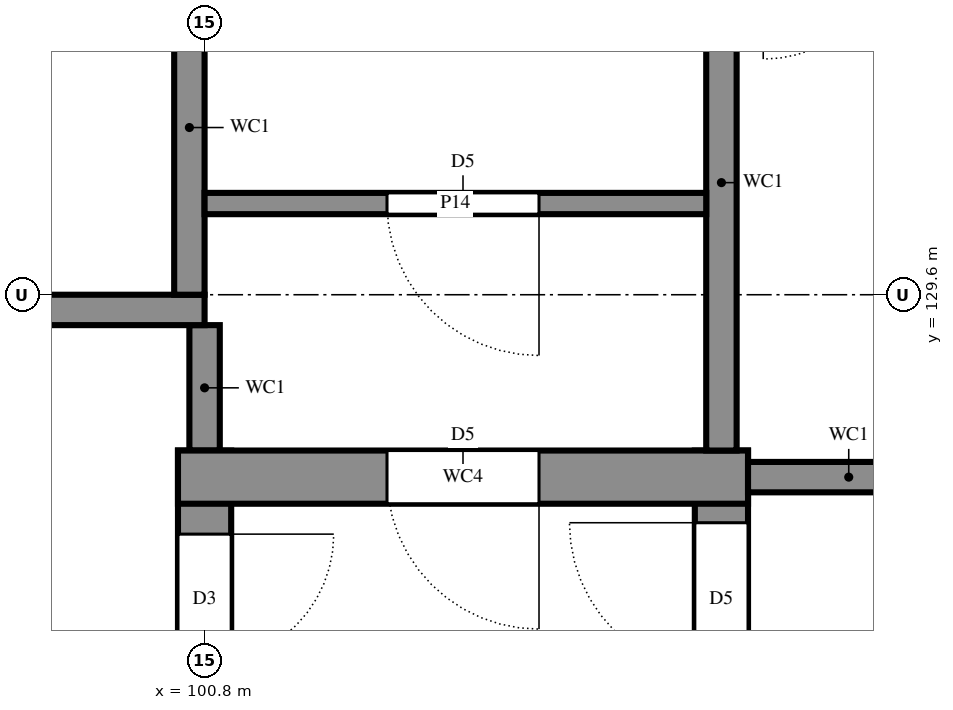
"""IFC4 building model, lengths in metres.
Left out: names, types, materials, properties, quantities, classifications, styles, units other than length and angle.
Written with IfcOpenShell. Run it as: python <this file> out.ifc"""

import sys

from ifc_helpers import new_model, si_unit, direction, frame, frame_2d, origin, place, context, subcontext, project, spatial, rectangle, extrude, element, fill, save


model = new_model("IFC4")
c1 = context("Model", 3, precision=1e-05, world=origin(), true_north=direction((0.0, 1.0)))
c2 = subcontext(c1, "Body", "Model", "MODEL_VIEW")
j1 = project(units=[si_unit("LENGTHUNIT", "METRE"), si_unit("PLANEANGLEUNIT", "RADIAN")], contexts=[c1])
p1 = place(None, origin())
s1 = spatial("IfcSite", under=j1, at=p1, CompositionType="ELEMENT")
p2 = place(p1, origin())
s2 = spatial("IfcBuilding", under=s1, at=p2, CompositionType="ELEMENT")
p3 = place(p2, frame((0.0, 0.0, 10.8)))
s3 = spatial("IfcBuildingStorey", under=s2, at=p3, CompositionType="ELEMENT", Elevation=10.8)
p4 = place(p3, frame((104.2, 125.1, 0.0), z_axis=(0.0, 0.0, 1.0), x_axis=(0.0, 1.0, 0.0)))
e1 = element("IfcWall", 1, at=p4, inside=s3, PredefinedType="SHEAR", context=c2, shape_type="SweptSolid", body=[
    extrude(rectangle(XDim=3.475, YDim=0.35, at=frame_2d((1.737, 0.0))), origin(), (0.0, 0.0, 1.0), 3.6),
])
p5 = place(p4, frame((2.0, 0.0, 0.0)))
e2 = element("IfcOpeningElement", 2, at=p5, cuts=e1, PredefinedType="OPENING", context=c2, shape_type="SweptSolid", body=[
    extrude(rectangle(XDim=1.0, YDim=2.1, at=frame_2d((0.5, 1.05))), frame((0.0, 0.185, 0.0), z_axis=(0.0, -1.0, 0.0), x_axis=(1.0, 0.0, 0.0)), (0.0, 0.0, 1.0), 0.37),
])
p6 = place(p3, frame((100.8, 128.575, 0.0), z_axis=(0.0, 0.0, 1.0), x_axis=(0.0, -1.0, 0.0)))
e3 = element("IfcWall", 3, at=p6, inside=s3, PredefinedType="SHEAR", context=c2, shape_type="SweptSolid", body=[
    extrude(rectangle(XDim=6.35, YDim=0.35, at=frame_2d((3.175, 0.0))), origin(), (0.0, 0.0, 1.0), 3.6),
])
p7 = place(p6, frame((0.55, 0.0, 0.0)))
e4 = element("IfcOpeningElement", 4, at=p7, cuts=e3, PredefinedType="OPENING", context=c2, shape_type="SweptSolid", body=[
    extrude(rectangle(XDim=0.85, YDim=2.1, at=frame_2d((0.425, 1.05))), frame((0.0, 0.185, 0.0), z_axis=(0.0, -1.0, 0.0), x_axis=(1.0, 0.0, 0.0)), (0.0, 0.0, 1.0), 0.37),
])
p8 = place(p3, frame((100.8, 128.575, 0.0), z_axis=(0.0, 0.0, 1.0), x_axis=(0.0, 1.0, 0.0)))
e5 = element("IfcWall", 5, at=p8, inside=s3, PredefinedType="SHEAR", context=c2, shape_type="SweptSolid", body=[
    extrude(rectangle(XDim=0.825, YDim=0.2, at=frame_2d((0.413, 0.0))), origin(), (0.0, 0.0, 1.0), 3.6),
])
p9 = place(p3, frame((104.375, 128.4, 0.0), z_axis=(0.0, 0.0, 1.0), x_axis=(-1.0, 0.0, 0.0)))
e6 = element("IfcWall", 6, at=p9, inside=s3, PredefinedType="SHEAR", context=c2, shape_type="SweptSolid", body=[
    extrude(rectangle(XDim=3.75, YDim=0.35, at=frame_2d((1.875, 0.0))), origin(), (0.0, 0.0, 1.0), 3.6),
])
p10 = place(p9, frame((1.375, 0.0, 0.0)))
e7 = element("IfcOpeningElement", 7, at=p10, cuts=e6, PredefinedType="OPENING", context=c2, shape_type="SweptSolid", body=[
    extrude(rectangle(XDim=1.0, YDim=2.1, at=frame_2d((0.5, 1.05))), frame((0.0, 0.185, 0.0), z_axis=(0.0, -1.0, 0.0), x_axis=(1.0, 0.0, 0.0)), (0.0, 0.0, 1.0), 0.37),
])
p11 = place(p3, frame((104.375, 128.4, 0.0), z_axis=(0.0, 0.0, 1.0), x_axis=(1.0, 0.0, 0.0)))
e8 = element("IfcWall", 8, at=p11, inside=s3, PredefinedType="SHEAR", context=c2, shape_type="SweptSolid", body=[
    extrude(rectangle(XDim=1.325, YDim=0.2, at=frame_2d((0.663, 0.0))), origin(), (0.0, 0.0, 1.0), 3.6),
])
p12 = place(p3, frame((104.2, 132.1, 0.0), z_axis=(0.0, 0.0, 1.0), x_axis=(0.0, -1.0, 0.0)))
e9 = element("IfcWall", 9, at=p12, inside=s3, PredefinedType="SHEAR", context=c2, shape_type="SweptSolid", body=[
    extrude(rectangle(XDim=3.525, YDim=0.2, at=frame_2d((1.763, 0.0))), origin(), (0.0, 0.0, 1.0), 3.6),
])
p13 = place(p3, frame((98.4, 129.5, 0.0), z_axis=(0.0, 0.0, 1.0), x_axis=(1.0, 0.0, 0.0)))
e10 = element("IfcWall", 10, at=p13, inside=s3, PredefinedType="SHEAR", context=c2, shape_type="SweptSolid", body=[
    extrude(rectangle(XDim=2.4, YDim=0.2, at=frame_2d((1.2, 0.0))), origin(), (0.0, 0.0, 1.0), 3.6),
])
p14 = place(p3, frame((100.7, 129.6, 0.0), z_axis=(0.0, 0.0, 1.0), x_axis=(0.0, 1.0, 0.0)))
e11 = element("IfcWall", 11, at=p14, inside=s3, PredefinedType="SHEAR", context=c2, shape_type="SweptSolid", body=[
    extrude(rectangle(XDim=2.2, YDim=0.2, at=frame_2d((1.1, 0.0))), origin(), (0.0, 0.0, 1.0), 3.6),
])
p15 = place(p3, frame((100.8, 130.2, 0.0), z_axis=(0.0, 0.0, 1.0), x_axis=(1.0, 0.0, 0.0)))
e12 = element("IfcWall", 12, at=p15, inside=s3, PredefinedType="PARTITIONING", context=c2, shape_type="SweptSolid", body=[
    extrude(rectangle(XDim=3.3, YDim=0.14, at=frame_2d((1.65, 0.0))), origin(), (0.0, 0.0, 1.0), 3.42),
])
p16 = place(p15, frame((1.2, 0.0, 0.0)))
e13 = element("IfcOpeningElement", 13, at=p16, cuts=e12, PredefinedType="OPENING", context=c2, shape_type="SweptSolid", body=[
    extrude(rectangle(XDim=1.0, YDim=2.1, at=frame_2d((0.5, 1.05))), frame((0.0, 0.08, 0.0), z_axis=(0.0, -1.0, 0.0), x_axis=(1.0, 0.0, 0.0)), (0.0, 0.0, 1.0), 0.16),
])
p17 = place(p16, frame((1.0, 0.0, 0.0), z_axis=(0.0, 0.0, 1.0), x_axis=(-1.0, 0.0, 0.0)))
e14 = element("IfcDoor", 14, at=p17, inside=s3, OperationType="SINGLE_SWING_RIGHT", PredefinedType="DOOR", context=c2, shape_type="SweptSolid", body=[
    extrude(rectangle(XDim=1.0, YDim=2.1, at=frame_2d((0.5, 1.05))), frame((0.0, 0.025, 0.0), z_axis=(0.0, -1.0, 0.0), x_axis=(1.0, 0.0, 0.0)), (0.0, 0.0, 1.0), 0.05),
])
fill(e13, e14)
p18 = place(p10, origin())
e15 = element("IfcDoor", 15, at=p18, inside=s3, OperationType="SINGLE_SWING_RIGHT", PredefinedType="DOOR", context=c2, shape_type="SweptSolid", body=[
    extrude(rectangle(XDim=1.0, YDim=2.1, at=frame_2d((0.5, 1.05))), frame((0.0, 0.025, 0.0), z_axis=(0.0, -1.0, 0.0), x_axis=(1.0, 0.0, 0.0)), (0.0, 0.0, 1.0), 0.05),
])
fill(e7, e15)
p19 = place(p7, origin())
e16 = element("IfcDoor", 16, at=p19, inside=s3, OperationType="SINGLE_SWING_RIGHT", PredefinedType="DOOR", context=c2, shape_type="SweptSolid", body=[
    extrude(rectangle(XDim=0.85, YDim=2.1, at=frame_2d((0.425, 1.05))), frame((0.0, 0.025, 0.0), z_axis=(0.0, -1.0, 0.0), x_axis=(1.0, 0.0, 0.0)), (0.0, 0.0, 1.0), 0.05),
])
fill(e4, e16)
p20 = place(p5, origin())
e17 = element("IfcDoor", 17, at=p20, inside=s3, OperationType="SINGLE_SWING_LEFT", PredefinedType="DOOR", context=c2, shape_type="SweptSolid", body=[
    extrude(rectangle(XDim=1.0, YDim=2.1, at=frame_2d((0.5, 1.05))), frame((0.0, 0.025, 0.0), z_axis=(0.0, -1.0, 0.0), x_axis=(1.0, 0.0, 0.0)), (0.0, 0.0, 1.0), 0.05),
])
fill(e2, e17)
save(model, sys.argv[1])
